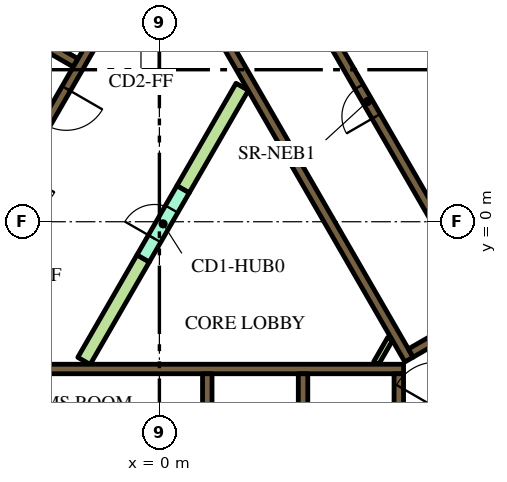
"""IFC4 building model, lengths in metres.
Left out: names, types, materials, properties, quantities, classifications, styles, units other than length and angle.
Written with IfcOpenShell. Run it as: python <this file> out.ifc"""

import sys

from ifc_helpers import new_model, si_unit, direction, frame, frame_2d, origin, place, context, subcontext, project, spatial, polyline, rectangle, outline, extrude, element, fill, save


model = new_model("IFC4")
c1 = context("Model", 3, precision=1e-05, world=origin(), true_north=direction((0.0, 1.0)))
c2 = subcontext(c1, "Body", "Model", "MODEL_VIEW")
j1 = project(units=[si_unit("LENGTHUNIT", "METRE"), si_unit("PLANEANGLEUNIT", "RADIAN")], contexts=[c1])
p1 = place(None, origin())
s1 = spatial("IfcSite", under=j1, at=p1, CompositionType="ELEMENT")
p2 = place(p1, origin())
s2 = spatial("IfcBuilding", under=s1, at=p2, CompositionType="ELEMENT")
p3 = place(p2, frame((0.0, 0.0, 107.1)))
s3 = spatial("IfcBuildingStorey", under=s2, at=p3, CompositionType="ELEMENT", Elevation=107.1)
p4 = place(p3, frame((6.711, 13.476, 0.0), z_axis=(0.0, 0.0, 1.0), x_axis=(0.500002723396, -0.866023831425, 0.0)))
e1 = element("IfcWall", 1, at=p4, inside=s3, PredefinedType="SOLIDWALL", context=c2, shape_type="SweptSolid", body=[
    extrude(rectangle(XDim=20.334, YDim=0.9, at=frame_2d((10.167, 0.0))), origin(), (0.0, 0.0, 1.0), 3.9),
])
p5 = place(p3, frame((-5.545, -3.875, 0.0), z_axis=(0.0, 0.0, 1.0), x_axis=(1.0, 0.0, 0.0)))
e2 = element("IfcWall", 2, at=p5, inside=s3, PredefinedType="SOLIDWALL", context=c2, shape_type="SweptSolid", body=[
    extrude(rectangle(XDim=11.97, YDim=0.25, at=frame_2d((5.985, 0.0))), origin(), (0.0, 0.0, 1.0), 3.9),
])
p6 = place(p3, frame((6.3, -7.268, 0.0), z_axis=(0.0, 0.0, 1.0), x_axis=(0.0, 1.0, 0.0)))
e3 = element("IfcWall", 3, at=p6, inside=s3, PredefinedType="SOLIDWALL", context=c2, shape_type="SweptSolid", body=[
    extrude(rectangle(XDim=3.268, YDim=0.25, at=frame_2d((1.634, 0.0))), origin(), (0.0, 0.0, 1.0), 3.9),
])
for number, where, z_axis, x_axis in (
    (4, (3.78, -4.0, 0.0), (0.0, 0.0, 1.0), (0.0, -1.0, 0.0)),
    (5, (1.26, -4.0, 0.0), (0.0, 0.0, 1.0), (0.0, -1.0, 0.0)),
):
    element("IfcWall", number, at=place(p3, frame(where, z_axis=z_axis, x_axis=x_axis)), inside=s3, PredefinedType="SOLIDWALL", context=c2, shape_type="SweptSolid", body=[
        extrude(rectangle(XDim=2.2, YDim=0.25, at=frame_2d((1.1, 0.0))), origin(), (0.0, 0.0, 1.0), 3.9),
    ])
p7 = place(p3, origin())
e6 = element("IfcWall", 6, at=p7, inside=s3, PredefinedType="SOLIDWALL", context=c2, shape_type="SweptSolid", body=[
    extrude(outline(polyline([(0.566, 6.725), (0.566, 6.875), (0.566, 6.875), (0.565, 6.875), (0.361, 6.875), (0.035, 7.439), (0.252, 7.564), (0.377, 7.348), (6.552, -3.348), (6.677, -3.564), (6.46, -3.689), (0.448, 6.725), (0.565, 6.725), (0.566, 6.725), (0.566, 6.725)])), origin(), (0.0, 0.0, 1.0), 3.9),
])
p8 = place(p3, frame((6.614, -3.456, 0.0), z_axis=(0.0, 0.0, 1.0), x_axis=(0.86602447079, 0.500001615989, 0.0)))
e7 = element("IfcWall", 7, at=p8, inside=s3, PredefinedType="SOLIDWALL", context=c2, shape_type="SweptSolid", body=[
    extrude(rectangle(XDim=3.154, YDim=0.25, at=frame_2d((1.577, 0.0))), origin(), (0.0, 0.0, 1.0), 3.9),
])
p9 = place(p3, frame((-8.06, -1.311, 0.0), z_axis=(0.0, 0.0, 1.0), x_axis=(0.50000273126, 0.866023826885, 0.0)))
e8 = element("IfcWall", 8, at=p9, inside=s3, PredefinedType="SOLIDWALL", context=c2, shape_type="SweptSolid", body=[
    extrude(rectangle(XDim=10.33, YDim=0.25, at=frame_2d((5.165, 0.0))), origin(), (0.0, 0.0, 1.0), 3.9),
])
p10 = place(p3, frame((-2.204, 4.182, 0.0), z_axis=(0.0, 0.0, 1.0), x_axis=(-0.866008176907, 0.50002983664, 0.0)))
e9 = element("IfcWall", 9, at=p10, inside=s3, PredefinedType="SOLIDWALL", context=c2, shape_type="SweptSolid", body=[
    extrude(rectangle(XDim=2.2, YDim=0.25, at=frame_2d((1.1, 0.0))), origin(), (0.0, 0.0, 1.0), 3.9),
])
p11 = place(p3, frame((5.705, -3.718, 0.0), z_axis=(0.0, 0.0, 1.0), x_axis=(0.499962090823, 0.866047289552, 0.0)))
e10 = element("IfcWall", 10, at=p11, inside=s3, PredefinedType="PARTITIONING", context=c2, shape_type="SweptSolid", body=[
    extrude(rectangle(XDim=0.735, YDim=0.15, at=frame_2d((0.367, 0.0))), origin(), (0.0, 0.0, 1.0), 2.75),
])
e11 = element("IfcWall", 11, at=p7, inside=s3, PredefinedType="PARTITIONING", context=c2, shape_type="SweptSolid", body=[
    extrude(outline(polyline([(-0.59, -0.872), (-0.265, -1.059), (-1.822, -3.756), (-2.147, -3.568), (-0.59, -0.872)])), origin(), (0.0, 0.0, 1.0), 2.75),
])
e12 = element("IfcWall", 12, at=p7, inside=s3, PredefinedType="PARTITIONING", context=c2, shape_type="SweptSolid", body=[
    extrude(outline(polyline([(2.017, 3.643), (2.342, 3.456), (0.785, 0.76), (0.46, 0.947), (2.017, 3.643)])), origin(), (0.0, 0.0, 1.0), 2.75),
])
p12 = place(p3, frame((11.553, -0.46, 0.0), z_axis=(0.0, 0.0, 1.0), x_axis=(-0.500006514828, 0.866021642414, 0.0)))
e13 = element("IfcWall", 13, at=p12, inside=s3, PredefinedType="SOLIDWALL", context=c2, shape_type="SweptSolid", body=[
    extrude(rectangle(XDim=12.35, YDim=0.25, at=frame_2d((6.175, 0.0))), origin(), (0.0, 0.0, 1.0), 3.9),
])
p13 = place(p12, frame((0.585, 0.0, 0.0)))
e14 = element("IfcOpeningElement", 14, at=p13, cuts=e13, PredefinedType="OPENING", context=c2, shape_type="SweptSolid", body=[
    extrude(rectangle(XDim=1.1, YDim=2.1, at=frame_2d((0.55, 1.05))), frame((0.0, 0.135, 0.0), z_axis=(0.0, -1.0, 0.0), x_axis=(1.0, 0.0, 0.0)), (0.0, 0.0, 1.0), 0.27),
])
p14 = place(p12, frame((3.105, 0.0, 0.0)))
e15 = element("IfcOpeningElement", 15, at=p14, cuts=e13, PredefinedType="OPENING", context=c2, shape_type="SweptSolid", body=[
    extrude(rectangle(XDim=1.1, YDim=2.1, at=frame_2d((0.55, 1.05))), frame((0.0, 0.135, 0.0), z_axis=(0.0, -1.0, 0.0), x_axis=(1.0, 0.0, 0.0)), (0.0, 0.0, 1.0), 0.27),
])
p15 = place(p12, frame((5.625, 0.0, 0.0)))
e16 = element("IfcOpeningElement", 16, at=p15, cuts=e13, PredefinedType="OPENING", context=c2, shape_type="SweptSolid", body=[
    extrude(rectangle(XDim=1.1, YDim=2.1, at=frame_2d((0.55, 1.05))), frame((0.0, 0.135, 0.0), z_axis=(0.0, -1.0, 0.0), x_axis=(1.0, 0.0, 0.0)), (0.0, 0.0, 1.0), 0.27),
])
p16 = place(p3, frame((8.565, -2.185, 0.0), z_axis=(0.0, 0.0, 1.0), x_axis=(-0.499997954832, 0.866026584559, 0.0)))
e17 = element("IfcWall", 17, at=p16, inside=s3, PredefinedType="SOLIDWALL", context=c2, shape_type="SweptSolid", body=[
    extrude(rectangle(XDim=12.35, YDim=0.25, at=frame_2d((6.175, 0.0))), origin(), (0.0, 0.0, 1.0), 3.9),
])
p17 = place(p16, frame((5.725, 0.0, 0.0)))
e18 = element("IfcOpeningElement", 18, at=p17, cuts=e17, PredefinedType="OPENING", context=c2, shape_type="SweptSolid", body=[
    extrude(rectangle(XDim=0.9, YDim=2.1, at=frame_2d((0.45, 1.05))), frame((0.0, 0.135, 0.0), z_axis=(0.0, -1.0, 0.0), x_axis=(1.0, 0.0, 0.0)), (0.0, 0.0, 1.0), 0.27),
])
p18 = place(p3, frame((-0.898, 6.194, 0.0), z_axis=(0.0, 0.0, 1.0), x_axis=(-0.499996202215, -0.866027596426, 0.0)))
e19 = element("IfcWall", 19, at=p18, inside=s3, PredefinedType="SOLIDWALL", context=c2, shape_type="SweptSolid", body=[
    extrude(rectangle(XDim=9.83, YDim=0.25, at=frame_2d((4.915, 0.0))), origin(), (0.0, 0.0, 1.0), 3.9),
])
p19 = place(p18, frame((0.585, 0.0, 0.0)))
e20 = element("IfcOpeningElement", 20, at=p19, cuts=e19, PredefinedType="OPENING", context=c2, shape_type="SweptSolid", body=[
    extrude(rectangle(XDim=1.1, YDim=2.1, at=frame_2d((0.55, 1.05))), frame((0.0, 0.135, 0.0), z_axis=(0.0, -1.0, 0.0), x_axis=(1.0, 0.0, 0.0)), (0.0, 0.0, 1.0), 0.27),
])
p20 = place(p18, frame((3.105, 0.0, 0.0)))
e21 = element("IfcOpeningElement", 21, at=p20, cuts=e19, PredefinedType="OPENING", context=c2, shape_type="SweptSolid", body=[
    extrude(rectangle(XDim=1.1, YDim=2.1, at=frame_2d((0.55, 1.05))), frame((0.0, 0.135, 0.0), z_axis=(0.0, -1.0, 0.0), x_axis=(1.0, 0.0, 0.0)), (0.0, 0.0, 1.0), 0.27),
])
p21 = place(p18, frame((5.625, 0.0, 0.0)))
e22 = element("IfcOpeningElement", 22, at=p21, cuts=e19, PredefinedType="OPENING", context=c2, shape_type="SweptSolid", body=[
    extrude(rectangle(XDim=1.1, YDim=2.1, at=frame_2d((0.55, 1.05))), frame((0.0, 0.135, 0.0), z_axis=(0.0, -1.0, 0.0), x_axis=(1.0, 0.0, 0.0)), (0.0, 0.0, 1.0), 0.27),
])
p22 = place(p18, frame((8.145, 0.0, 0.0)))
e23 = element("IfcOpeningElement", 23, at=p22, cuts=e19, PredefinedType="OPENING", context=c2, shape_type="SweptSolid", body=[
    extrude(rectangle(XDim=1.1, YDim=2.1, at=frame_2d((0.55, 1.05))), frame((0.0, 0.135, 0.0), z_axis=(0.0, -1.0, 0.0), x_axis=(1.0, 0.0, 0.0)), (0.0, 0.0, 1.0), 0.27),
])
p23 = place(p3, frame((7.053, -5.284, 0.0), z_axis=(0.0, 0.0, 1.0), x_axis=(0.500078061341, 0.865980330357, 0.0)))
e24 = element("IfcWall", 24, at=p23, inside=s3, PredefinedType="SOLIDWALL", context=c2, shape_type="SweptSolid", body=[
    extrude(rectangle(XDim=2.1, YDim=0.4, at=frame_2d((1.05, 0.0))), origin(), (0.0, 0.0, 1.0), 3.9),
])
p24 = place(p23, frame((0.45, 0.0, 0.0)))
e25 = element("IfcOpeningElement", 25, at=p24, cuts=e24, PredefinedType="OPENING", context=c2, shape_type="SweptSolid", body=[
    extrude(rectangle(XDim=1.2, YDim=2.1, at=frame_2d((0.6, 1.05))), frame((0.0, 0.21, 0.0), z_axis=(0.0, -1.0, 0.0), x_axis=(1.0, 0.0, 0.0)), (0.0, 0.0, 1.0), 0.42),
])
p25 = place(p3, frame((-0.427, -0.966, 0.0), z_axis=(0.0, 0.0, 1.0), x_axis=(0.49994051562, 0.866059744384, 0.0)))
e26 = element("IfcWall", 26, at=p25, inside=s3, PredefinedType="PARTITIONING", context=c2, shape_type="SweptSolid", body=[
    extrude(rectangle(XDim=2.1, YDim=0.375, at=frame_2d((1.05, 0.0))), origin(), (0.0, 0.0, 1.0), 2.75),
])
p26 = place(p25, frame((0.6, 0.0, 0.0)))
e27 = element("IfcOpeningElement", 27, at=p26, cuts=e26, PredefinedType="OPENING", context=c2, shape_type="SweptSolid", body=[
    extrude(rectangle(XDim=0.9, YDim=2.1, at=frame_2d((0.45, 1.05))), frame((0.0, 0.198, 0.0), z_axis=(0.0, -1.0, 0.0), x_axis=(1.0, 0.0, 0.0)), (0.0, 0.0, 1.0), 0.395),
])
p27 = place(p3, frame((6.163, 18.475, 0.0), z_axis=(0.0, 0.0, 1.0), x_axis=(0.500001317485, -0.866024643133, 0.0)))
e28 = element("IfcWall", 28, at=p27, inside=s3, PredefinedType="PARTITIONING", context=c2, shape_type="SweptSolid", body=[
    extrude(rectangle(XDim=25.767, YDim=0.15, at=frame_2d((12.883, 0.0))), origin(), (0.0, 0.0, 1.0), 2.75),
])
p28 = place(p27, frame((24.241, 0.0, 0.0)))
e29 = element("IfcOpeningElement", 29, at=p28, cuts=e28, PredefinedType="OPENING", context=c2, shape_type="SweptSolid", body=[
    extrude(rectangle(XDim=1.0, YDim=2.1, at=frame_2d((0.5, 1.05))), frame((0.0, 0.085, 0.0), z_axis=(0.0, -1.0, 0.0), x_axis=(1.0, 0.0, 0.0)), (0.0, 0.0, 1.0), 0.17),
])
p29 = place(p27, frame((13.144, 0.0, 0.0)))
e30 = element("IfcOpeningElement", 30, at=p29, cuts=e28, PredefinedType="OPENING", context=c2, shape_type="SweptSolid", body=[
    extrude(rectangle(XDim=1.0, YDim=2.1, at=frame_2d((0.5, 1.05))), frame((0.0, 0.085, 0.0), z_axis=(0.0, -1.0, 0.0), x_axis=(1.0, 0.0, 0.0)), (0.0, 0.0, 1.0), 0.17),
])
p30 = place(p27, frame((10.874, 0.0, 0.0)))
e31 = element("IfcOpeningElement", 31, at=p30, cuts=e28, PredefinedType="OPENING", context=c2, shape_type="SweptSolid", body=[
    extrude(rectangle(XDim=0.9, YDim=2.1, at=frame_2d((0.45, 1.05))), frame((0.0, 0.085, 0.0), z_axis=(0.0, -1.0, 0.0), x_axis=(1.0, 0.0, 0.0)), (0.0, 0.0, 1.0), 0.17),
])
p31 = place(p27, frame((3.718, 0.0, 0.0)))
e32 = element("IfcOpeningElement", 32, at=p31, cuts=e28, PredefinedType="OPENING", context=c2, shape_type="SweptSolid", body=[
    extrude(rectangle(XDim=1.0, YDim=2.1, at=frame_2d((0.5, 1.05))), frame((0.0, 0.085, 0.0), z_axis=(0.0, -1.0, 0.0), x_axis=(1.0, 0.0, 0.0)), (0.0, 0.0, 1.0), 0.17),
])
p32 = place(p27, frame((2.411, 0.0, 0.0)))
e33 = element("IfcOpeningElement", 33, at=p32, cuts=e28, PredefinedType="OPENING", context=c2, shape_type="SweptSolid", body=[
    extrude(rectangle(XDim=1.0, YDim=2.1, at=frame_2d((0.5, 1.05))), frame((0.0, 0.085, 0.0), z_axis=(0.0, -1.0, 0.0), x_axis=(1.0, 0.0, 0.0)), (0.0, 0.0, 1.0), 0.17),
])
p33 = place(p17, origin())
e34 = element("IfcDoor", 34, at=p33, inside=s3, OperationType="SINGLE_SWING_LEFT", PredefinedType="DOOR", context=c2, shape_type="SweptSolid", body=[
    extrude(rectangle(XDim=0.9, YDim=2.1, at=frame_2d((0.45, 1.05))), frame((0.0, 0.025, 0.0), z_axis=(0.0, -1.0, 0.0), x_axis=(1.0, 0.0, 0.0)), (0.0, 0.0, 1.0), 0.05),
])
fill(e18, e34)
p34 = place(p20, origin())
e35 = element("IfcDoor", 35, at=p34, inside=s3, OperationType="DOUBLE_DOOR_SLIDING", PredefinedType="DOOR", context=c2, shape_type="SweptSolid", body=[
    extrude(rectangle(XDim=1.1, YDim=2.1, at=frame_2d((0.55, 1.05))), frame((0.0, 0.025, 0.0), z_axis=(0.0, -1.0, 0.0), x_axis=(1.0, 0.0, 0.0)), (0.0, 0.0, 1.0), 0.05),
])
fill(e21, e35)
p35 = place(p26, origin())
e36 = element("IfcDoor", 36, at=p35, inside=s3, OperationType="SINGLE_SWING_LEFT", PredefinedType="DOOR", context=c2, shape_type="SweptSolid", body=[
    extrude(rectangle(XDim=0.9, YDim=2.1, at=frame_2d((0.45, 1.05))), frame((0.0, 0.025, 0.0), z_axis=(0.0, -1.0, 0.0), x_axis=(1.0, 0.0, 0.0)), (0.0, 0.0, 1.0), 0.05),
])
fill(e27, e36)
save(model, sys.argv[1])
